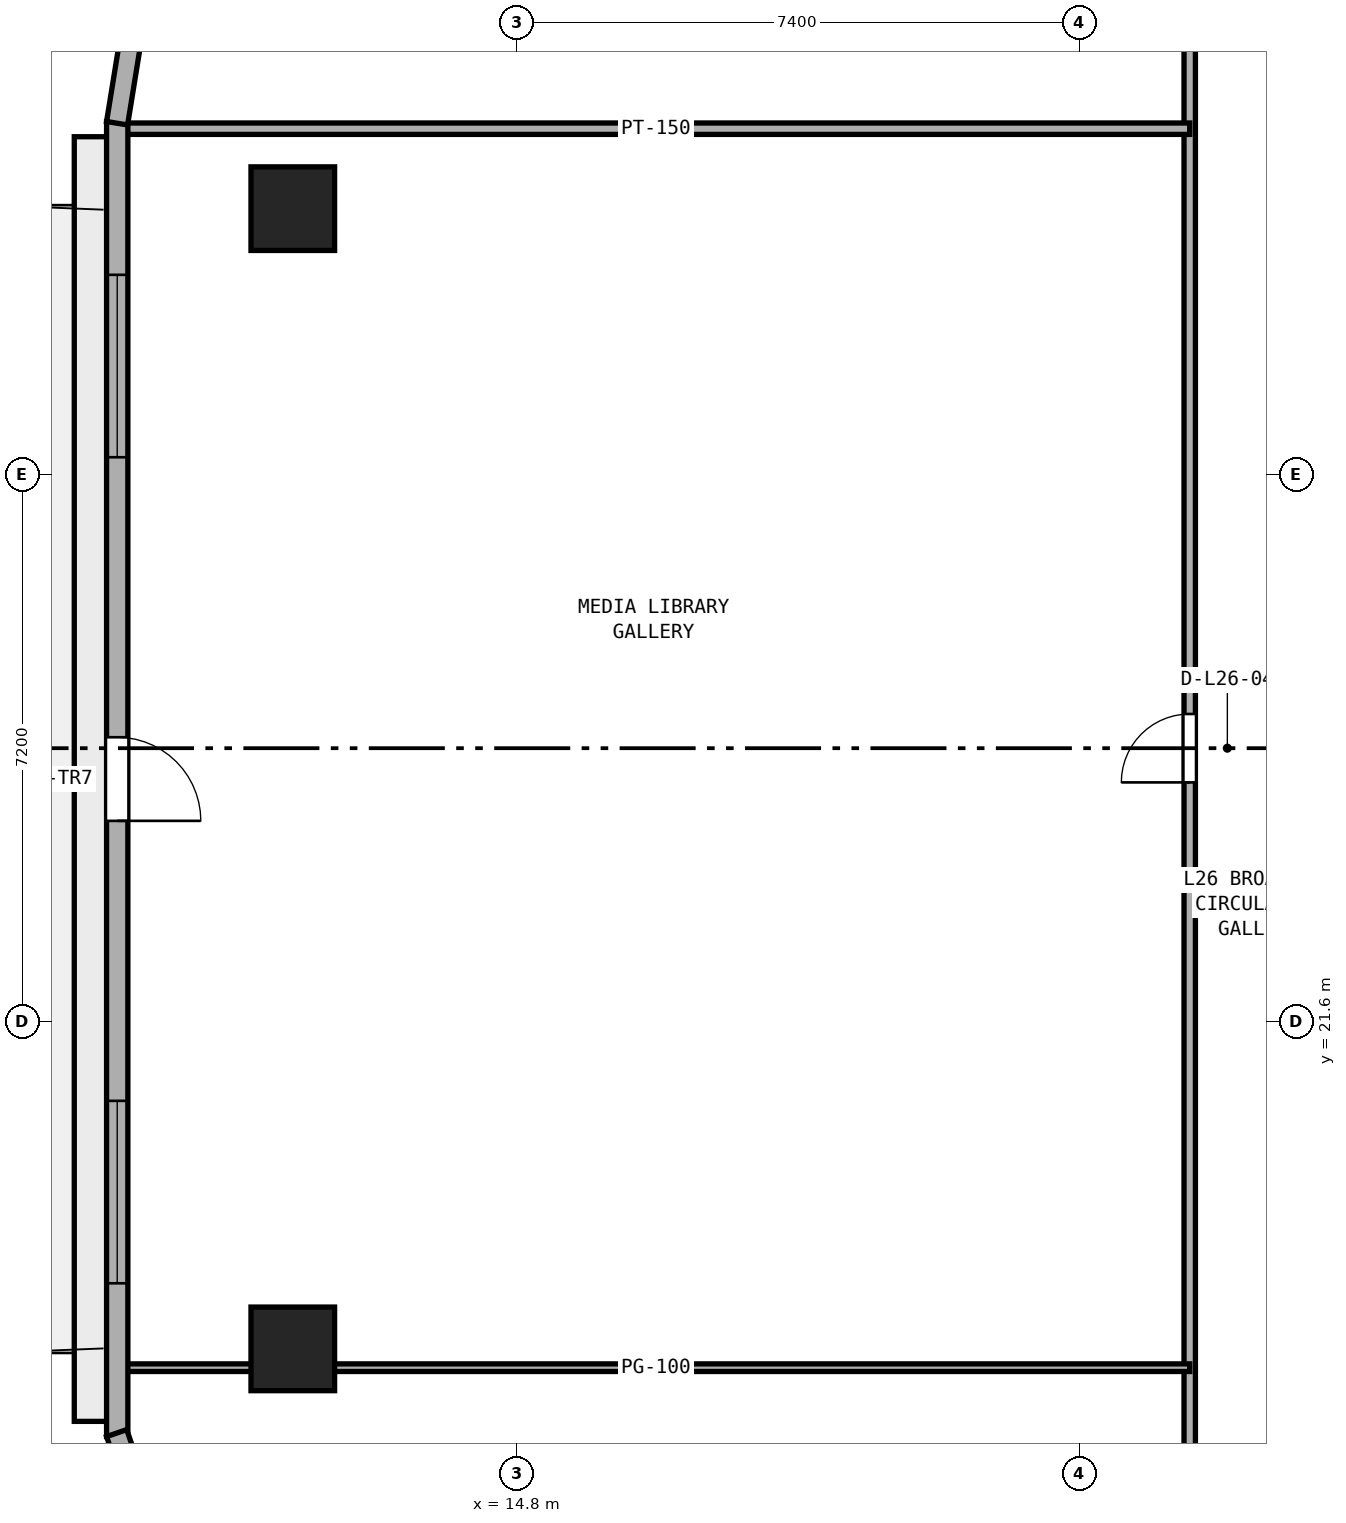
"""IFC4 building model, lengths in metres.
Left out: names, types, materials, properties, quantities, classifications, styles, units other than length and angle.
Written with IfcOpenShell. Run it as: python <this file> out.ifc"""

import sys

from ifc_helpers import new_model, si_unit, direction, frame, frame_2d, origin, origin_2d, place, context, subcontext, project, spatial, rectangle, extrude, element, fill, save


model = new_model("IFC4")
c1 = context("Model", 3, precision=1e-05, world=origin(), true_north=direction((0.0, 1.0)))
c2 = subcontext(c1, "Body", "Model", "MODEL_VIEW")
j1 = project(units=[si_unit("LENGTHUNIT", "METRE"), si_unit("PLANEANGLEUNIT", "RADIAN")], contexts=[c1])
p1 = place(None, origin())
s1 = spatial("IfcSite", under=j1, at=p1, CompositionType="ELEMENT")
p2 = place(p1, origin())
s2 = spatial("IfcBuilding", under=s1, at=p2, CompositionType="ELEMENT")
p3 = place(p2, frame((0.0, 0.0, 104.8)))
s3 = spatial("IfcBuildingStorey", under=s2, at=p3, CompositionType="ELEMENT", Elevation=104.8)
for number, where, z_axis, x_axis in (
    (1, (11.85, 32.298, 0.0), (0.0, 0.0, 1.0), (1.0, 0.0, 0.0)),
    (2, (11.85, 17.298, 0.0), (0.0, 0.0, 1.0), (1.0, 0.0, 0.0)),
):
    element("IfcColumn", number, at=place(p3, frame(where, z_axis=z_axis, x_axis=x_axis)), inside=s3, PredefinedType="COLUMN", context=c2, shape_type="SweptSolid", body=[
        extrude(rectangle(XDim=1.1, YDim=1.1, at=origin_2d()), origin(), (0.0, 0.0, 1.0), 3.8),
    ])
p4 = place(p3, frame((23.65, 15.25, 0.0), z_axis=(0.0, 0.0, 1.0), x_axis=(0.0, 1.0, 0.0)))
e3 = element("IfcWall", 3, at=p4, inside=s3, PredefinedType="PARTITIONING", context=c2, shape_type="SweptSolid", body=[
    extrude(rectangle(XDim=19.9, YDim=0.15, at=frame_2d((9.95, 0.0))), origin(), (0.0, 0.0, 1.0), 3.525),
])
p5 = place(p4, frame((9.5, 0.0, 0.0)))
e4 = element("IfcOpeningElement", 4, at=p5, cuts=e3, PredefinedType="OPENING", context=c2, shape_type="SweptSolid", body=[
    extrude(rectangle(XDim=0.9, YDim=2.1, at=frame_2d((0.45, 1.05))), frame((0.0, 0.085, 0.0), z_axis=(0.0, -1.0, 0.0), x_axis=(1.0, 0.0, 0.0)), (0.0, 0.0, 1.0), 0.17),
])
p6 = place(p3, frame((9.605, 17.05, 0.0), z_axis=(0.0, 0.0, 1.0), x_axis=(1.0, 0.0, 0.0)))
e5 = element("IfcWall", 5, at=p6, inside=s3, PredefinedType="PARTITIONING", context=c2, shape_type="SweptSolid", body=[
    extrude(rectangle(XDim=14.045, YDim=0.1, at=frame_2d((7.022, 0.0))), origin(), (0.0, 0.0, 1.0), 3.525),
])
p7 = place(p3, frame((9.605, 33.35, 0.0), z_axis=(0.0, 0.0, 1.0), x_axis=(1.0, 0.0, 0.0)))
e6 = element("IfcWall", 6, at=p7, inside=s3, PredefinedType="PARTITIONING", context=c2, shape_type="SweptSolid", body=[
    extrude(rectangle(XDim=14.045, YDim=0.15, at=frame_2d((7.022, 0.0))), origin(), (0.0, 0.0, 1.0), 3.525),
])
p8 = place(p3, frame((9.54, 33.444, 0.0), z_axis=(0.0, 0.0, 1.0), x_axis=(0.0, -1.0, 0.0)))
e7 = element("IfcWall", 7, at=p8, inside=s3, PredefinedType="STANDARD", context=c2, shape_type="SweptSolid", body=[
    extrude(rectangle(XDim=17.301, YDim=0.28, at=frame_2d((8.65, 0.0))), origin(), (0.0, 0.0, 1.0), 3.525),
])
p9 = place(p8, frame((8.1, 0.0, 0.0)))
e8 = element("IfcOpeningElement", 8, at=p9, cuts=e7, PredefinedType="OPENING", context=c2, shape_type="SweptSolid", body=[
    extrude(rectangle(XDim=1.1, YDim=2.2, at=frame_2d((0.55, 1.1))), frame((0.0, 0.15, 0.0), z_axis=(0.0, -1.0, 0.0), x_axis=(1.0, 0.0, 0.0)), (0.0, 0.0, 1.0), 0.3),
])
p10 = place(p8, frame((2.017, 0.0, 0.9)))
e9 = element("IfcOpeningElement", 9, at=p10, cuts=e7, PredefinedType="OPENING", context=c2, shape_type="SweptSolid", body=[
    extrude(rectangle(XDim=2.4, YDim=1.75, at=frame_2d((1.2, 0.875))), frame((0.0, 0.15, 0.0), z_axis=(0.0, -1.0, 0.0), x_axis=(1.0, 0.0, 0.0)), (0.0, 0.0, 1.0), 0.3),
])
p11 = place(p8, frame((12.884, 0.0, 0.9)))
e10 = element("IfcOpeningElement", 10, at=p11, cuts=e7, PredefinedType="OPENING", context=c2, shape_type="SweptSolid", body=[
    extrude(rectangle(XDim=2.4, YDim=1.75, at=frame_2d((1.2, 0.875))), frame((0.0, 0.15, 0.0), z_axis=(0.0, -1.0, 0.0), x_axis=(1.0, 0.0, 0.0)), (0.0, 0.0, 1.0), 0.3),
])
p12 = place(p3, frame((9.753, 34.749, 0.0), z_axis=(0.0, 0.0, 1.0), x_axis=(-0.160037671962, -0.987110907423, 0.0)))
e11 = element("IfcWall", 11, at=p12, inside=s3, PredefinedType="STANDARD", context=c2, shape_type="SweptSolid", body=[
    extrude(rectangle(XDim=1.344, YDim=0.28, at=frame_2d((0.672, 0.0))), origin(), (0.0, 0.0, 1.0), 3.525),
])
p13 = place(p3, frame((9.532, 16.189, 0.0), z_axis=(0.0, 0.0, 1.0), x_axis=(0.32708309668, -0.944995580871, 0.0)))
e12 = element("IfcWall", 12, at=p13, inside=s3, PredefinedType="STANDARD", context=c2, shape_type="SweptSolid", body=[
    extrude(rectangle(XDim=2.748, YDim=0.28, at=frame_2d((1.374, 0.0))), origin(), (0.0, 0.0, 1.0), 3.525),
])
p14 = place(p5, origin())
e13 = element("IfcDoor", 13, at=p14, inside=s3, OperationType="SINGLE_SWING_LEFT", PredefinedType="DOOR", context=c2, shape_type="SweptSolid", body=[
    extrude(rectangle(XDim=0.9, YDim=2.1, at=frame_2d((0.45, 1.05))), frame((0.0, 0.025, 0.0), z_axis=(0.0, -1.0, 0.0), x_axis=(1.0, 0.0, 0.0)), (0.0, 0.0, 1.0), 0.05),
])
fill(e4, e13)
p15 = place(p9, origin())
e14 = element("IfcDoor", 14, at=p15, inside=s3, OperationType="SINGLE_SWING_RIGHT", PredefinedType="DOOR", context=c2, shape_type="SweptSolid", body=[
    extrude(rectangle(XDim=1.1, YDim=2.2, at=frame_2d((0.55, 1.1))), frame((0.0, 0.025, 0.0), z_axis=(0.0, -1.0, 0.0), x_axis=(1.0, 0.0, 0.0)), (0.0, 0.0, 1.0), 0.05),
])
fill(e8, e14)
p16 = place(p10, origin())
e15 = element("IfcWindow", 15, at=p16, inside=s3, PartitioningType="SINGLE_PANEL", PredefinedType="WINDOW", context=c2, shape_type="SweptSolid", body=[
    extrude(rectangle(XDim=2.4, YDim=1.75, at=frame_2d((1.2, 0.875))), frame((0.0, 0.03, 0.0), z_axis=(0.0, -1.0, 0.0), x_axis=(1.0, 0.0, 0.0)), (0.0, 0.0, 1.0), 0.06),
])
fill(e9, e15)
p17 = place(p11, origin())
e16 = element("IfcWindow", 16, at=p17, inside=s3, PartitioningType="SINGLE_PANEL", PredefinedType="WINDOW", context=c2, shape_type="SweptSolid", body=[
    extrude(rectangle(XDim=2.4, YDim=1.75, at=frame_2d((1.2, 0.875))), frame((0.0, 0.03, 0.0), z_axis=(0.0, -1.0, 0.0), x_axis=(1.0, 0.0, 0.0)), (0.0, 0.0, 1.0), 0.06),
])
fill(e10, e16)
save(model, sys.argv[1])
